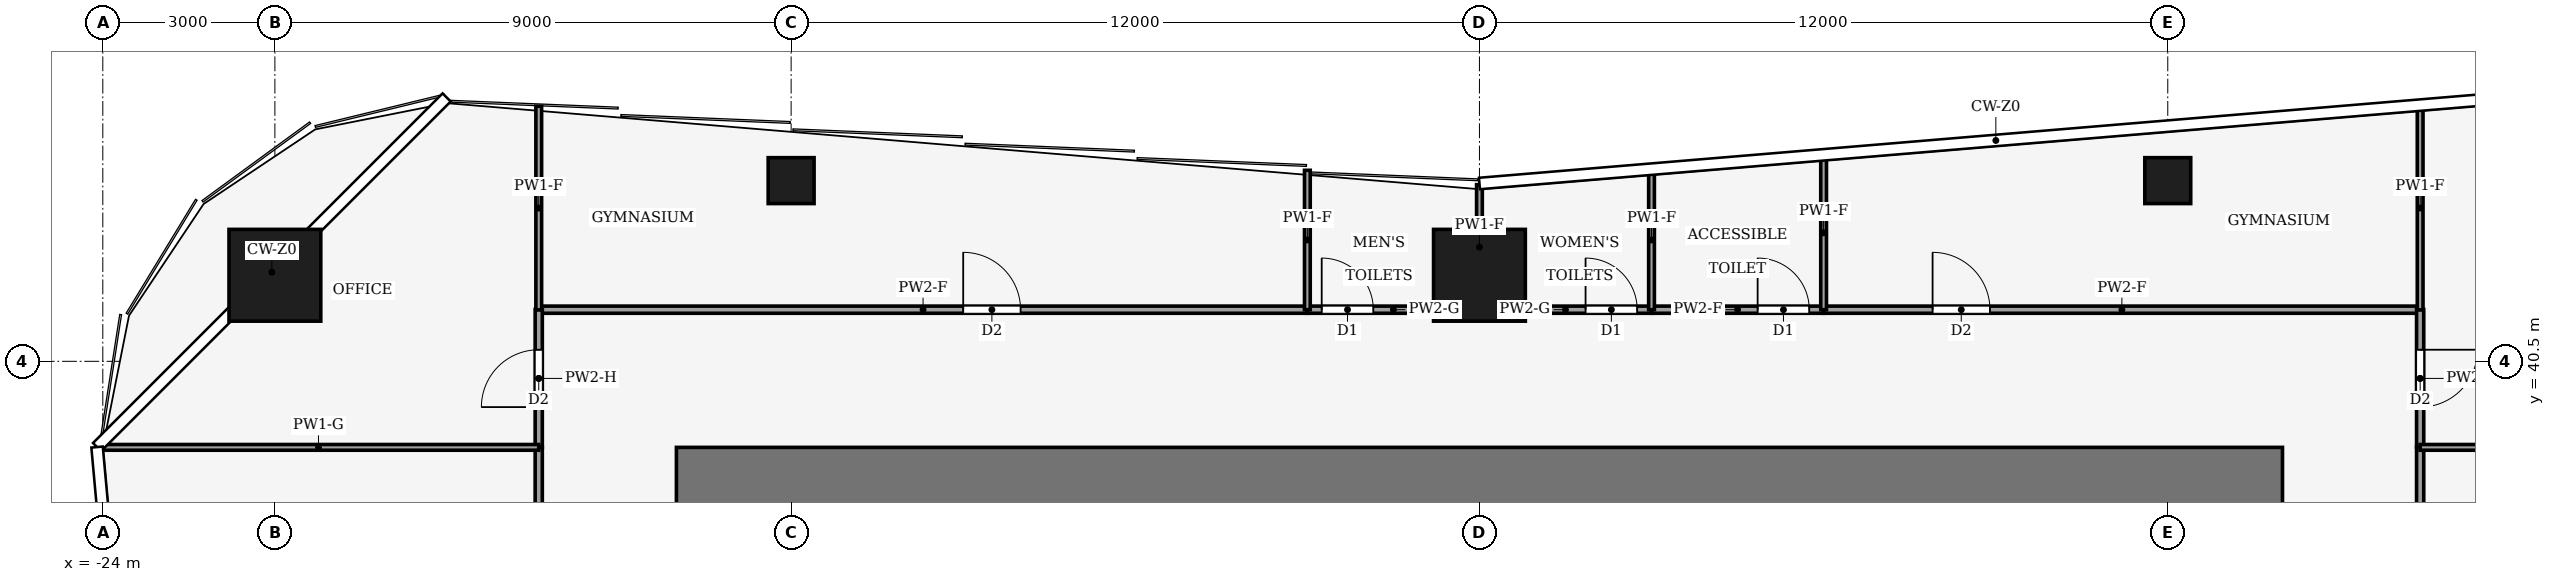
"""IFC4 building model, lengths in metres.
Left out: names, types, materials, properties, quantities, classifications, styles, units other than length and angle.
Written with IfcOpenShell. Run it as: python <this file> out.ifc"""

import sys

from ifc_helpers import new_model, si_unit, direction, frame, frame_2d, origin, origin_2d, place, context, subcontext, project, spatial, rectangle, hollow_rectangle, extrude, element, fill, save


model = new_model("IFC4")
c1 = context("Model", 3, precision=1e-05, world=origin(), true_north=direction((0.0, 1.0)))
c2 = subcontext(c1, "Body", "Model", "MODEL_VIEW")
j1 = project(units=[si_unit("LENGTHUNIT", "METRE"), si_unit("PLANEANGLEUNIT", "RADIAN")], contexts=[c1])
p1 = place(None, origin())
s1 = spatial("IfcSite", under=j1, at=p1, CompositionType="ELEMENT")
p2 = place(p1, origin())
s2 = spatial("IfcBuilding", under=s1, at=p2, CompositionType="ELEMENT")
p3 = place(p2, frame((0.0, 0.0, 18.0)))
s3 = spatial("IfcBuildingStorey", under=s2, at=p3, CompositionType="ELEMENT", Elevation=18.0)
p4 = place(p3, frame((-14.0, 38.3, -0.13), z_axis=(0.0, 0.0, 1.0), x_axis=(1.0, 0.0, 0.0)))
e1 = element("IfcWall", 1, at=p4, inside=s3, PredefinedType="SHEAR", context=c2, shape_type="SweptSolid", body=[
    extrude(rectangle(XDim=28.0, YDim=1.4, at=frame_2d((14.0, 0.0))), origin(), (0.0, 0.0, 1.0), 4.0),
])
for number, where, z_axis, x_axis in (
    (2, (-21.0, 42.0, 0.0), (0.0, 0.0, 1.0), (1.0, 0.0, 0.0)),
    (3, (0.0, 42.0, 0.0), (0.0, 0.0, 1.0), (1.0, 0.0, 0.0)),
):
    element("IfcColumn", number, at=place(p3, frame(where, z_axis=z_axis, x_axis=x_axis)), inside=s3, PredefinedType="COLUMN", context=c2, shape_type="SweptSolid", body=[
        extrude(hollow_rectangle(XDim=1.6, YDim=1.6, WallThickness=0.09, at=origin_2d()), origin(), (0.0, 0.0, 1.0), 4.0),
    ])
for number, where, z_axis, x_axis in (
    (4, (-12.0, 43.65, 0.0), (0.0, 0.0, 1.0), (1.0, 0.0, 0.0)),
    (5, (12.0, 43.65, 0.0), (0.0, 0.0, 1.0), (1.0, 0.0, 0.0)),
):
    element("IfcColumn", number, at=place(p3, frame(where, z_axis=z_axis, x_axis=x_axis)), inside=s3, PredefinedType="COLUMN", context=c2, shape_type="SweptSolid", body=[
        extrude(hollow_rectangle(XDim=0.8, YDim=0.8, WallThickness=0.04, at=origin_2d()), origin(), (0.0, 0.0, 1.0), 4.0),
    ])
p5 = place(p3, frame((-16.4, 41.4, 0.0), z_axis=(0.0, 0.0, 1.0), x_axis=(1.0, 0.0, 0.0)))
e6 = element("IfcWall", 6, at=p5, inside=s3, PredefinedType="PARTITIONING", context=c2, shape_type="SweptSolid", body=[
    extrude(rectangle(XDim=13.4, YDim=0.125, at=frame_2d((6.7, 0.0))), origin(), (0.0, 0.0, 1.0), 3.54),
])
p6 = place(p5, frame((7.4, 0.0, 0.0)))
e7 = element("IfcOpeningElement", 7, at=p6, cuts=e6, PredefinedType="OPENING", context=c2, shape_type="SweptSolid", body=[
    extrude(rectangle(XDim=1.0, YDim=2.1, at=frame_2d((0.5, 1.05))), frame((0.0, 0.073, 0.0), z_axis=(0.0, -1.0, 0.0), x_axis=(1.0, 0.0, 0.0)), (0.0, 0.0, 1.0), 0.145),
])
p7 = place(p3, frame((-3.0, 41.4, 0.0), z_axis=(0.0, 0.0, 1.0), x_axis=(1.0, 0.0, 0.0)))
e8 = element("IfcWall", 8, at=p7, inside=s3, PredefinedType="PARTITIONING", context=c2, shape_type="SweptSolid", body=[
    extrude(rectangle(XDim=3.0, YDim=0.125, at=frame_2d((1.5, 0.0))), origin(), (0.0, 0.0, 1.0), 3.87),
])
p8 = place(p7, frame((0.25, 0.0, 0.0)))
e9 = element("IfcOpeningElement", 9, at=p8, cuts=e8, PredefinedType="OPENING", context=c2, shape_type="SweptSolid", body=[
    extrude(rectangle(XDim=0.9, YDim=2.1, at=frame_2d((0.45, 1.05))), frame((0.0, 0.073, 0.0), z_axis=(0.0, -1.0, 0.0), x_axis=(1.0, 0.0, 0.0)), (0.0, 0.0, 1.0), 0.145),
])
p9 = place(p3, frame((0.0, 41.4, 0.0), z_axis=(0.0, 0.0, 1.0), x_axis=(1.0, 0.0, 0.0)))
e10 = element("IfcWall", 10, at=p9, inside=s3, PredefinedType="PARTITIONING", context=c2, shape_type="SweptSolid", body=[
    extrude(rectangle(XDim=3.0, YDim=0.125, at=frame_2d((1.5, 0.0))), origin(), (0.0, 0.0, 1.0), 3.87),
])
p10 = place(p9, frame((1.85, 0.0, 0.0)))
e11 = element("IfcOpeningElement", 11, at=p10, cuts=e10, PredefinedType="OPENING", context=c2, shape_type="SweptSolid", body=[
    extrude(rectangle(XDim=0.9, YDim=2.1, at=frame_2d((0.45, 1.05))), frame((0.0, 0.073, 0.0), z_axis=(0.0, -1.0, 0.0), x_axis=(1.0, 0.0, 0.0)), (0.0, 0.0, 1.0), 0.145),
])
p11 = place(p3, frame((3.0, 41.4, 0.0), z_axis=(0.0, 0.0, 1.0), x_axis=(1.0, 0.0, 0.0)))
e12 = element("IfcWall", 12, at=p11, inside=s3, PredefinedType="PARTITIONING", context=c2, shape_type="SweptSolid", body=[
    extrude(rectangle(XDim=3.0, YDim=0.125, at=frame_2d((1.5, 0.0))), origin(), (0.0, 0.0, 1.0), 3.54),
])
p12 = place(p11, frame((1.85, 0.0, 0.0)))
e13 = element("IfcOpeningElement", 13, at=p12, cuts=e12, PredefinedType="OPENING", context=c2, shape_type="SweptSolid", body=[
    extrude(rectangle(XDim=0.9, YDim=2.1, at=frame_2d((0.45, 1.05))), frame((0.0, 0.073, 0.0), z_axis=(0.0, -1.0, 0.0), x_axis=(1.0, 0.0, 0.0)), (0.0, 0.0, 1.0), 0.145),
])
p13 = place(p3, frame((6.0, 41.4, 0.0), z_axis=(0.0, 0.0, 1.0), x_axis=(1.0, 0.0, 0.0)))
e14 = element("IfcWall", 14, at=p13, inside=s3, PredefinedType="PARTITIONING", context=c2, shape_type="SweptSolid", body=[
    extrude(rectangle(XDim=10.4, YDim=0.125, at=frame_2d((5.2, 0.0))), origin(), (0.0, 0.0, 1.0), 3.54),
])
p14 = place(p13, frame((1.9, 0.0, 0.0)))
e15 = element("IfcOpeningElement", 15, at=p14, cuts=e14, PredefinedType="OPENING", context=c2, shape_type="SweptSolid", body=[
    extrude(rectangle(XDim=1.0, YDim=2.1, at=frame_2d((0.5, 1.05))), frame((0.0, 0.073, 0.0), z_axis=(0.0, -1.0, 0.0), x_axis=(1.0, 0.0, 0.0)), (0.0, 0.0, 1.0), 0.145),
])
p15 = place(p3, frame((-16.4, 33.0, 0.0), z_axis=(0.0, 0.0, 1.0), x_axis=(0.0, 1.0, 0.0)))
e16 = element("IfcWall", 16, at=p15, inside=s3, PredefinedType="PARTITIONING", context=c2, shape_type="SweptSolid", body=[
    extrude(rectangle(XDim=6.0, YDim=0.125, at=frame_2d((3.0, 0.0))), origin(), (0.0, 0.0, 1.0), 3.14),
])
p16 = place(p15, frame((2.5, 0.0, 0.0)))
e17 = element("IfcOpeningElement", 17, at=p16, cuts=e16, PredefinedType="OPENING", context=c2, shape_type="SweptSolid", body=[
    extrude(rectangle(XDim=1.0, YDim=2.1, at=frame_2d((0.5, 1.05))), frame((0.0, 0.073, 0.0), z_axis=(0.0, -1.0, 0.0), x_axis=(1.0, 0.0, 0.0)), (0.0, 0.0, 1.0), 0.145),
])
p17 = place(p3, frame((-16.4, 39.0, 0.0), z_axis=(0.0, 0.0, 1.0), x_axis=(0.0, 1.0, 0.0)))
e18 = element("IfcWall", 18, at=p17, inside=s3, PredefinedType="PARTITIONING", context=c2, shape_type="SweptSolid", body=[
    extrude(rectangle(XDim=2.404, YDim=0.125, at=frame_2d((1.202, 0.0))), origin(), (0.0, 0.0, 1.0), 3.14),
])
p18 = place(p17, frame((0.702, 0.0, 0.0)))
e19 = element("IfcOpeningElement", 19, at=p18, cuts=e18, PredefinedType="OPENING", context=c2, shape_type="SweptSolid", body=[
    extrude(rectangle(XDim=1.0, YDim=2.1, at=frame_2d((0.5, 1.05))), frame((0.0, 0.073, 0.0), z_axis=(0.0, -1.0, 0.0), x_axis=(1.0, 0.0, 0.0)), (0.0, 0.0, 1.0), 0.145),
])
p19 = place(p3, frame((16.4, 39.0, 0.0), z_axis=(0.0, 0.0, 1.0), x_axis=(0.0, -1.0, 0.0)))
e20 = element("IfcWall", 20, at=p19, inside=s3, PredefinedType="PARTITIONING", context=c2, shape_type="SweptSolid", body=[
    extrude(rectangle(XDim=9.0, YDim=0.125, at=frame_2d((4.5, 0.0))), origin(), (0.0, 0.0, 1.0), 3.14),
])
p20 = place(p19, frame((4.0, 0.0, 0.0)))
e21 = element("IfcOpeningElement", 21, at=p20, cuts=e20, PredefinedType="OPENING", context=c2, shape_type="SweptSolid", body=[
    extrude(rectangle(XDim=1.0, YDim=2.1, at=frame_2d((0.5, 1.05))), frame((0.0, 0.073, 0.0), z_axis=(0.0, -1.0, 0.0), x_axis=(1.0, 0.0, 0.0)), (0.0, 0.0, 1.0), 0.145),
])
p21 = place(p3, frame((16.4, 41.404, 0.0), z_axis=(0.0, 0.0, 1.0), x_axis=(0.0, -1.0, 0.0)))
e22 = element("IfcWall", 22, at=p21, inside=s3, PredefinedType="PARTITIONING", context=c2, shape_type="SweptSolid", body=[
    extrude(rectangle(XDim=2.404, YDim=0.125, at=frame_2d((1.202, 0.0))), origin(), (0.0, 0.0, 1.0), 3.14),
])
p22 = place(p21, frame((0.702, 0.0, 0.0)))
e23 = element("IfcOpeningElement", 23, at=p22, cuts=e22, PredefinedType="OPENING", context=c2, shape_type="SweptSolid", body=[
    extrude(rectangle(XDim=1.0, YDim=2.1, at=frame_2d((0.5, 1.05))), frame((0.0, 0.073, 0.0), z_axis=(0.0, -1.0, 0.0), x_axis=(1.0, 0.0, 0.0)), (0.0, 0.0, 1.0), 0.145),
])
p23 = place(p3, frame((-3.0, 41.4, 0.0), z_axis=(0.0, 0.0, 1.0), x_axis=(0.0, 1.0, 0.0)))
e24 = element("IfcWall", 24, at=p23, inside=s3, PredefinedType="PARTITIONING", context=c2, shape_type="SweptSolid", body=[
    extrude(rectangle(XDim=2.43, YDim=0.1, at=frame_2d((1.215, 0.0))), origin(), (0.0, 0.0, 1.0), 3.04),
])
p24 = place(p3, frame((-16.4, 44.947, 0.0), z_axis=(0.0, 0.0, 1.0), x_axis=(0.0, -1.0, 0.0)))
e25 = element("IfcWall", 25, at=p24, inside=s3, PredefinedType="PARTITIONING", context=c2, shape_type="SweptSolid", body=[
    extrude(rectangle(XDim=3.551, YDim=0.1, at=frame_2d((1.775, 0.0))), origin(), (0.0, 0.0, 1.0), 3.04),
])
p25 = place(p3, frame((0.0, 41.4, 0.0), z_axis=(0.0, 0.0, 1.0), x_axis=(0.0, 1.0, 0.0)))
e26 = element("IfcWall", 26, at=p25, inside=s3, PredefinedType="PARTITIONING", context=c2, shape_type="SweptSolid", body=[
    extrude(rectangle(XDim=2.18, YDim=0.1, at=frame_2d((1.09, 0.0))), origin(), (0.0, 0.0, 1.0), 3.04),
])
p26 = place(p3, frame((3.0, 41.4, 0.0), z_axis=(0.0, 0.0, 1.0), x_axis=(0.0, 1.0, 0.0)))
e27 = element("IfcWall", 27, at=p26, inside=s3, PredefinedType="PARTITIONING", context=c2, shape_type="SweptSolid", body=[
    extrude(rectangle(XDim=2.43, YDim=0.1, at=frame_2d((1.215, 0.0))), origin(), (0.0, 0.0, 1.0), 3.04),
])
p27 = place(p3, frame((6.0, 41.4, 0.0), z_axis=(0.0, 0.0, 1.0), x_axis=(0.0, 1.0, 0.0)))
e28 = element("IfcWall", 28, at=p27, inside=s3, PredefinedType="PARTITIONING", context=c2, shape_type="SweptSolid", body=[
    extrude(rectangle(XDim=2.68, YDim=0.1, at=frame_2d((1.34, 0.0))), origin(), (0.0, 0.0, 1.0), 3.04),
])
p28 = place(p3, frame((16.4, 41.396, 0.0), z_axis=(0.0, 0.0, 1.0), x_axis=(0.0, 1.0, 0.0)))
e29 = element("IfcWall", 29, at=p28, inside=s3, PredefinedType="PARTITIONING", context=c2, shape_type="SweptSolid", body=[
    extrude(rectangle(XDim=3.551, YDim=0.1, at=frame_2d((1.775, 0.0))), origin(), (0.0, 0.0, 1.0), 3.04),
])
for number, where, z_axis, x_axis in (
    (30, (-16.4, 39.0, 0.0), (0.0, 0.0, 1.0), (-1.0, 0.0, 0.0)),
    (31, (24.08, 39.0, 0.0), (0.0, 0.0, 1.0), (-1.0, 0.0, 0.0)),
):
    element("IfcWall", number, at=place(p3, frame(where, z_axis=z_axis, x_axis=x_axis)), inside=s3, PredefinedType="PARTITIONING", context=c2, shape_type="SweptSolid", body=[
        extrude(rectangle(XDim=7.68, YDim=0.1, at=frame_2d((3.84, 0.0))), origin(), (0.0, 0.0, 1.0), 2.93),
    ])
p29 = place(p6, origin())
e32 = element("IfcDoor", 32, at=p29, inside=s3, OperationType="SINGLE_SWING_RIGHT", PredefinedType="DOOR", context=c2, shape_type="SweptSolid", body=[
    extrude(rectangle(XDim=1.0, YDim=2.1, at=frame_2d((0.5, 1.05))), frame((0.0, 0.025, 0.0), z_axis=(0.0, -1.0, 0.0), x_axis=(1.0, 0.0, 0.0)), (0.0, 0.0, 1.0), 0.05),
])
fill(e7, e32)
p30 = place(p8, origin())
e33 = element("IfcDoor", 33, at=p30, inside=s3, OperationType="SINGLE_SWING_LEFT", PredefinedType="DOOR", context=c2, shape_type="SweptSolid", body=[
    extrude(rectangle(XDim=0.9, YDim=2.1, at=frame_2d((0.45, 1.05))), frame((0.0, 0.025, 0.0), z_axis=(0.0, -1.0, 0.0), x_axis=(1.0, 0.0, 0.0)), (0.0, 0.0, 1.0), 0.05),
])
fill(e9, e33)
p31 = place(p10, origin())
e34 = element("IfcDoor", 34, at=p31, inside=s3, OperationType="SINGLE_SWING_RIGHT", PredefinedType="DOOR", context=c2, shape_type="SweptSolid", body=[
    extrude(rectangle(XDim=0.9, YDim=2.1, at=frame_2d((0.45, 1.05))), frame((0.0, 0.025, 0.0), z_axis=(0.0, -1.0, 0.0), x_axis=(1.0, 0.0, 0.0)), (0.0, 0.0, 1.0), 0.05),
])
fill(e11, e34)
p32 = place(p12, origin())
e35 = element("IfcDoor", 35, at=p32, inside=s3, OperationType="SINGLE_SWING_RIGHT", PredefinedType="DOOR", context=c2, shape_type="SweptSolid", body=[
    extrude(rectangle(XDim=0.9, YDim=2.1, at=frame_2d((0.45, 1.05))), frame((0.0, 0.025, 0.0), z_axis=(0.0, -1.0, 0.0), x_axis=(1.0, 0.0, 0.0)), (0.0, 0.0, 1.0), 0.05),
])
fill(e13, e35)
p33 = place(p14, origin())
e36 = element("IfcDoor", 36, at=p33, inside=s3, OperationType="SINGLE_SWING_LEFT", PredefinedType="DOOR", context=c2, shape_type="SweptSolid", body=[
    extrude(rectangle(XDim=1.0, YDim=2.1, at=frame_2d((0.5, 1.05))), frame((0.0, 0.025, 0.0), z_axis=(0.0, -1.0, 0.0), x_axis=(1.0, 0.0, 0.0)), (0.0, 0.0, 1.0), 0.05),
])
fill(e15, e36)
p34 = place(p18, origin())
e37 = element("IfcDoor", 37, at=p34, inside=s3, OperationType="SINGLE_SWING_RIGHT", PredefinedType="DOOR", context=c2, shape_type="SweptSolid", body=[
    extrude(rectangle(XDim=1.0, YDim=2.1, at=frame_2d((0.5, 1.05))), frame((0.0, 0.025, 0.0), z_axis=(0.0, -1.0, 0.0), x_axis=(1.0, 0.0, 0.0)), (0.0, 0.0, 1.0), 0.05),
])
fill(e19, e37)
p35 = place(p22, origin())
e38 = element("IfcDoor", 38, at=p35, inside=s3, OperationType="SINGLE_SWING_RIGHT", PredefinedType="DOOR", context=c2, shape_type="SweptSolid", body=[
    extrude(rectangle(XDim=1.0, YDim=2.1, at=frame_2d((0.5, 1.05))), frame((0.0, 0.025, 0.0), z_axis=(0.0, -1.0, 0.0), x_axis=(1.0, 0.0, 0.0)), (0.0, 0.0, 1.0), 0.05),
])
fill(e23, e38)
save(model, sys.argv[1])
